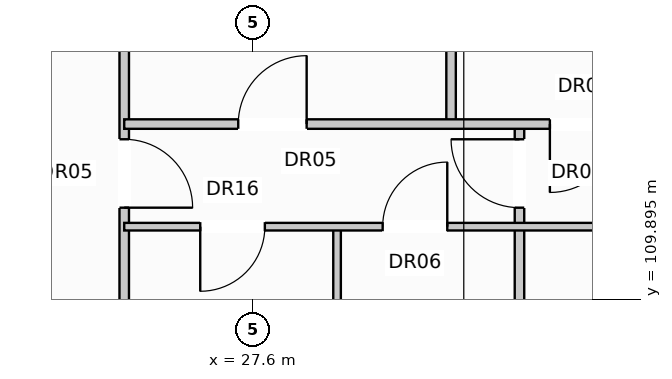
"""IFC4 building model, lengths in metres.
Left out: names, types, materials, properties, quantities, classifications, styles, units other than length and angle.
Written with IfcOpenShell. Run it as: python <this file> out.ifc"""

import sys

from ifc_helpers import new_model, si_unit, direction, frame, frame_2d, origin, origin_with_axes, place, context, subcontext, project, spatial, rectangle, extrude, element, fill, save


model = new_model("IFC4")
c1 = context("Model", 3, precision=1e-05, world=origin(), true_north=direction((0.0, 1.0)))
c2 = subcontext(c1, "Body", "Model", "MODEL_VIEW")
j1 = project(units=[si_unit("LENGTHUNIT", "METRE"), si_unit("PLANEANGLEUNIT", "RADIAN")], contexts=[c1])
p1 = place(None, origin())
s1 = spatial("IfcSite", under=j1, at=p1, CompositionType="ELEMENT")
p2 = place(p1, origin())
s2 = spatial("IfcBuilding", under=s1, at=p2, CompositionType="ELEMENT")
p3 = place(p2, frame((0.0, 0.0, 17.6)))
s3 = spatial("IfcBuildingStorey", under=s2, at=p3, CompositionType="ELEMENT", Elevation=17.6)
p4 = place(p3, frame((25.9, 108.15, 0.0), z_axis=(0.0, 0.0, 1.0), x_axis=(0.0, 1.0, 0.0)))
e1 = element("IfcWall", 1, at=p4, inside=s3, PredefinedType="PARTITIONING", context=c2, shape_type="SweptSolid", body=[
    extrude(rectangle(XDim=7.65, YDim=0.125, at=frame_2d((3.825, 0.0))), origin(), (0.0, 0.0, 1.0), 2.95),
])
p5 = place(p4, frame((2.95, 0.0, 0.0)))
e2 = element("IfcOpeningElement", 2, at=p5, cuts=e1, PredefinedType="OPENING", context=c2, shape_type="SweptSolid", body=[
    extrude(rectangle(XDim=0.9, YDim=2.1, at=frame_2d((0.45, 1.05))), frame((0.0, 0.074, 0.0), z_axis=(0.0, -1.0, 0.0), x_axis=(1.0, 0.0, 0.0)), (0.0, 0.0, 1.0), 0.149),
])
p6 = place(p3, frame((28.7, 108.15, 0.0), z_axis=(0.0, 0.0, 1.0), x_axis=(0.0, 1.0, 0.0)))
e3 = element("IfcWall", 3, at=p6, inside=s3, PredefinedType="PARTITIONING", context=c2, shape_type="SweptSolid", body=[
    extrude(rectangle(XDim=2.7, YDim=0.1, at=frame_2d((1.35, 0.0))), origin(), (0.0, 0.0, 1.0), 2.59),
])
p7 = place(p3, frame((31.1, 108.15, 0.0), z_axis=(0.0, 0.0, 1.0), x_axis=(0.0, 1.0, 0.0)))
e4 = element("IfcWall", 4, at=p7, inside=s3, PredefinedType="PARTITIONING", context=c2, shape_type="SweptSolid", body=[
    extrude(rectangle(XDim=4.05, YDim=0.125, at=frame_2d((2.025, 0.0))), origin(), (0.0, 0.0, 1.0), 2.95),
])
p8 = place(p7, frame((2.95, 0.0, 0.0)))
e5 = element("IfcOpeningElement", 5, at=p8, cuts=e4, PredefinedType="OPENING", context=c2, shape_type="SweptSolid", body=[
    extrude(rectangle(XDim=0.9, YDim=2.1, at=frame_2d((0.45, 1.05))), frame((0.0, 0.074, 0.0), z_axis=(0.0, -1.0, 0.0), x_axis=(1.0, 0.0, 0.0)), (0.0, 0.0, 1.0), 0.149),
])
p9 = place(p3, frame((30.2, 112.2, 0.0), z_axis=(0.0, 0.0, 1.0), x_axis=(0.0, 1.0, 0.0)))
e6 = element("IfcWall", 6, at=p9, inside=s3, PredefinedType="PARTITIONING", context=c2, shape_type="SweptSolid", body=[
    extrude(rectangle(XDim=3.6, YDim=0.125, at=frame_2d((1.8, 0.0))), origin(), (0.0, 0.0, 1.0), 2.95),
])
p10 = place(p3, frame((25.9, 110.85, 0.0), z_axis=(0.0, 0.0, 1.0), x_axis=(1.0, 0.0, 0.0)))
e7 = element("IfcWall", 7, at=p10, inside=s3, PredefinedType="PARTITIONING", context=c2, shape_type="SweptSolid", body=[
    extrude(rectangle(XDim=8.5, YDim=0.1, at=frame_2d((4.25, 0.0))), origin(), (0.0, 0.0, 1.0), 2.95),
])
p11 = place(p10, frame((1.0, 0.0, 0.0)))
e8 = element("IfcOpeningElement", 8, at=p11, cuts=e7, PredefinedType="OPENING", context=c2, shape_type="SweptSolid", body=[
    extrude(rectangle(XDim=0.85, YDim=2.1, at=frame_2d((0.425, 1.05))), frame((0.0, 0.062, 0.0), z_axis=(0.0, -1.0, 0.0), x_axis=(1.0, 0.0, 0.0)), (0.0, 0.0, 1.0), 0.124),
])
p12 = place(p10, frame((3.4, 0.0, 0.0)))
e9 = element("IfcOpeningElement", 9, at=p12, cuts=e7, PredefinedType="OPENING", context=c2, shape_type="SweptSolid", body=[
    extrude(rectangle(XDim=0.85, YDim=2.05, at=frame_2d((0.425, 1.025))), frame((0.0, 0.062, 0.0), z_axis=(0.0, -1.0, 0.0), x_axis=(1.0, 0.0, 0.0)), (0.0, 0.0, 1.0), 0.124),
])
p13 = place(p10, frame((6.2, 0.0, 0.0)))
e10 = element("IfcOpeningElement", 10, at=p13, cuts=e7, PredefinedType="OPENING", context=c2, shape_type="SweptSolid", body=[
    extrude(rectangle(XDim=0.85, YDim=2.05, at=frame_2d((0.425, 1.025))), frame((0.0, 0.062, 0.0), z_axis=(0.0, -1.0, 0.0), x_axis=(1.0, 0.0, 0.0)), (0.0, 0.0, 1.0), 0.124),
])
p14 = place(p3, frame((25.9, 112.2, 0.0), z_axis=(0.0, 0.0, 1.0), x_axis=(1.0, 0.0, 0.0)))
e11 = element("IfcWall", 11, at=p14, inside=s3, PredefinedType="PARTITIONING", context=c2, shape_type="SweptSolid", body=[
    extrude(rectangle(XDim=8.5, YDim=0.125, at=frame_2d((4.25, 0.0))), origin(), (0.0, 0.0, 1.0), 2.95),
])
p15 = place(p14, frame((1.5, 0.0, 0.0)))
e12 = element("IfcOpeningElement", 12, at=p15, cuts=e11, PredefinedType="OPENING", context=c2, shape_type="SweptSolid", body=[
    extrude(rectangle(XDim=0.9, YDim=2.1, at=frame_2d((0.45, 1.05))), frame((0.0, 0.074, 0.0), z_axis=(0.0, -1.0, 0.0), x_axis=(1.0, 0.0, 0.0)), (0.0, 0.0, 1.0), 0.149),
])
p16 = place(p14, frame((5.6, 0.0, 0.0)))
e13 = element("IfcOpeningElement", 13, at=p16, cuts=e11, PredefinedType="OPENING", context=c2, shape_type="SweptSolid", body=[
    extrude(rectangle(XDim=0.9, YDim=2.1, at=frame_2d((0.45, 1.05))), frame((0.0, 0.074, 0.0), z_axis=(0.0, -1.0, 0.0), x_axis=(1.0, 0.0, 0.0)), (0.0, 0.0, 1.0), 0.149),
])
p17 = place(p5, frame((0.9, 0.0, 0.0), z_axis=(0.0, 0.0, 1.0), x_axis=(-1.0, 0.0, 0.0)))
e14 = element("IfcDoor", 14, at=p17, inside=s3, OperationType="SINGLE_SWING_LEFT", PredefinedType="DOOR", context=c2, shape_type="SweptSolid", body=[
    extrude(rectangle(XDim=0.9, YDim=2.1, at=frame_2d((0.45, 1.05))), frame((0.0, 0.025, 0.0), z_axis=(0.0, -1.0, 0.0), x_axis=(1.0, 0.0, 0.0)), (0.0, 0.0, 1.0), 0.05),
])
fill(e2, e14)
p18 = place(p8, origin_with_axes())
e15 = element("IfcDoor", 15, at=p18, inside=s3, OperationType="SINGLE_SWING_RIGHT", PredefinedType="DOOR", context=c2, shape_type="SweptSolid", body=[
    extrude(rectangle(XDim=0.9, YDim=2.1, at=frame_2d((0.45, 1.05))), frame((0.0, 0.025, 0.0), z_axis=(0.0, -1.0, 0.0), x_axis=(1.0, 0.0, 0.0)), (0.0, 0.0, 1.0), 0.05),
])
fill(e5, e15)
p19 = place(p11, frame((0.85, 0.0, 0.0), z_axis=(0.0, 0.0, 1.0), x_axis=(-1.0, 0.0, 0.0)))
e16 = element("IfcDoor", 16, at=p19, inside=s3, OperationType="SINGLE_SWING_LEFT", PredefinedType="DOOR", context=c2, shape_type="SweptSolid", body=[
    extrude(rectangle(XDim=0.85, YDim=2.1, at=frame_2d((0.425, 1.05))), frame((0.0, 0.025, 0.0), z_axis=(0.0, -1.0, 0.0), x_axis=(1.0, 0.0, 0.0)), (0.0, 0.0, 1.0), 0.05),
])
fill(e8, e16)
p20 = place(p12, origin_with_axes())
e17 = element("IfcDoor", 17, at=p20, inside=s3, OperationType="SINGLE_SWING_RIGHT", PredefinedType="DOOR", context=c2, shape_type="SweptSolid", body=[
    extrude(rectangle(XDim=0.85, YDim=2.05, at=frame_2d((0.425, 1.025))), frame((0.0, 0.025, 0.0), z_axis=(0.0, -1.0, 0.0), x_axis=(1.0, 0.0, 0.0)), (0.0, 0.0, 1.0), 0.05),
])
fill(e9, e17)
p21 = place(p15, origin_with_axes())
e18 = element("IfcDoor", 18, at=p21, inside=s3, OperationType="SINGLE_SWING_RIGHT", PredefinedType="DOOR", context=c2, shape_type="SweptSolid", body=[
    extrude(rectangle(XDim=0.9, YDim=2.1, at=frame_2d((0.45, 1.05))), frame((0.0, 0.025, 0.0), z_axis=(0.0, -1.0, 0.0), x_axis=(1.0, 0.0, 0.0)), (0.0, 0.0, 1.0), 0.05),
])
fill(e12, e18)
p22 = place(p16, frame((0.9, 0.0, 0.0), z_axis=(0.0, 0.0, 1.0), x_axis=(-1.0, 0.0, 0.0)))
e19 = element("IfcDoor", 19, at=p22, inside=s3, OperationType="SINGLE_SWING_LEFT", PredefinedType="DOOR", context=c2, shape_type="SweptSolid", body=[
    extrude(rectangle(XDim=0.9, YDim=2.1, at=frame_2d((0.45, 1.05))), frame((0.0, 0.025, 0.0), z_axis=(0.0, -1.0, 0.0), x_axis=(1.0, 0.0, 0.0)), (0.0, 0.0, 1.0), 0.05),
])
fill(e13, e19)
save(model, sys.argv[1])
